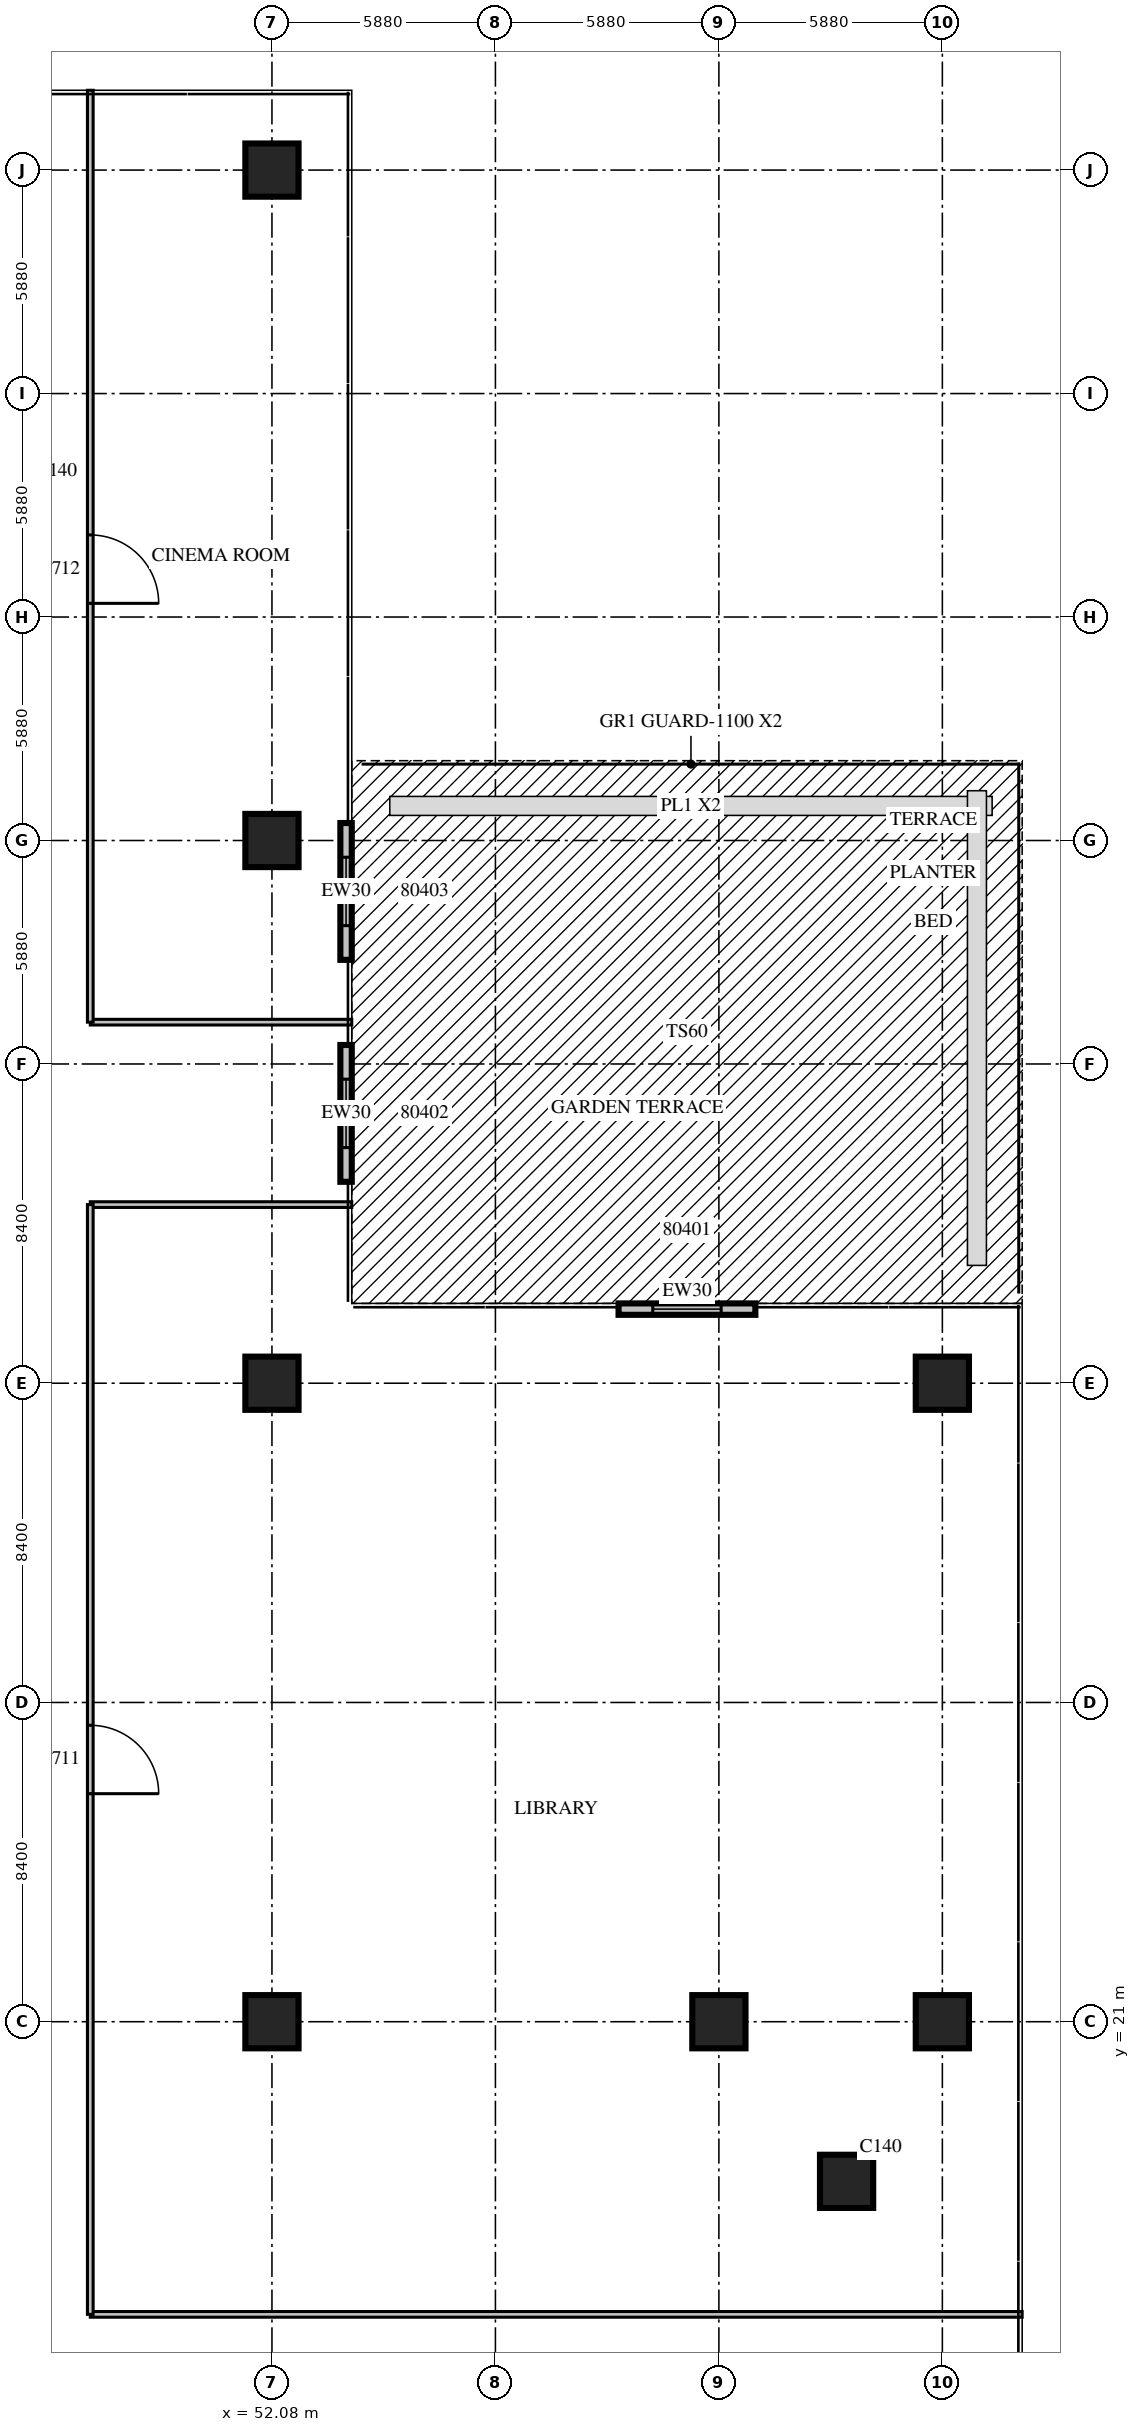
"""IFC4 building model, lengths in metres.
Left out: names, types, materials, properties, quantities, classifications, styles, units other than length and angle.
Written with IfcOpenShell. Run it as: python <this file> out.ifc"""

import sys

from ifc_helpers import new_model, si_unit, direction, frame, frame_2d, origin, origin_2d, place, context, subcontext, project, spatial, rectangle, extrude, source, transform, mapped, element, fill, save


model = new_model("IFC4")
c1 = context("Model", 3, precision=1e-05, world=origin(), true_north=direction((0.0, 1.0)))
c2 = subcontext(c1, "Body", "Model", "MODEL_VIEW")
j1 = project(units=[si_unit("LENGTHUNIT", "METRE"), si_unit("PLANEANGLEUNIT", "RADIAN")], contexts=[c1])
p1 = place(None, origin())
s1 = spatial("IfcSite", under=j1, at=p1, CompositionType="ELEMENT")
p2 = place(p1, origin())
s2 = spatial("IfcBuilding", under=s1, at=p2, CompositionType="ELEMENT")
p3 = place(p2, frame((0.0, 0.0, 23.7)))
s3 = spatial("IfcBuildingStorey", under=s2, at=p3, CompositionType="ELEMENT", Elevation=23.7)
m1 = source(origin(), c2, "Body", "SweptSolid", [
    extrude(rectangle(XDim=1.4, YDim=1.4, at=origin_2d()), origin(), (0.0, 0.0, 1.0), 5.4),
])
for number, where, z_axis, x_axis in (
    (1, (52.08, 21.0, 0.0), (0.0, 0.0, 1.0), (1.0, 0.0, 0.0)),
    (2, (52.08, 37.8, 0.0), (0.0, 0.0, 1.0), (1.0, 0.0, 0.0)),
    (3, (52.08, 52.08, 0.0), (0.0, 0.0, 1.0), (1.0, 0.0, 0.0)),
    (4, (52.08, 69.72, 0.0), (0.0, 0.0, 1.0), (1.0, 0.0, 0.0)),
    (5, (63.84, 21.0, 0.0), (0.0, 0.0, 1.0), (1.0, 0.0, 0.0)),
    (6, (67.2, 16.8, 0.0), (0.0, 0.0, 1.0), (1.0, 0.0, 0.0)),
    (7, (69.72, 21.0, 0.0), (0.0, 0.0, 1.0), (1.0, 0.0, 0.0)),
    (8, (69.72, 37.8, 0.0), (0.0, 0.0, 1.0), (1.0, 0.0, 0.0)),
):
    element("IfcColumn", number, at=place(p3, frame(where, z_axis=z_axis, x_axis=x_axis)), inside=s3, PredefinedType="COLUMN", context=c2, shape_type="MappedRepresentation", body=[
        mapped(m1, transform((0.0, 0.0, 0.0), scale=1.0)),
    ])
m2 = source(origin(), c2, "Body", "SweptSolid", [
    extrude(rectangle(XDim=3.6, YDim=0.3, at=frame_2d((1.8, 0.0))), origin(), (0.0, 0.0, 1.0), 4.8),
])
p4 = place(p3, frame((64.8, 39.75, 0.0), z_axis=(0.0, 0.0, 1.0), x_axis=(-1.0, 0.0, 0.0)))
e9 = element("IfcWall", 9, at=p4, inside=s3, PredefinedType="STANDARD", context=c2, shape_type="MappedRepresentation", body=[
    mapped(m2, transform((0.0, 0.0, 0.0), scale=1.0)),
])
m3 = source(origin(), c2, "Body", "SweptSolid", [
    extrude(rectangle(XDim=1.8, YDim=2.4, at=frame_2d((0.9, 1.2))), frame((0.0, 0.16, 0.0), z_axis=(0.0, -1.0, 0.0), x_axis=(1.0, 0.0, 0.0)), (0.0, 0.0, 1.0), 0.32),
])
p5 = place(p4, frame((0.9, 0.0, 0.0)))
e10 = element("IfcOpeningElement", 10, at=p5, cuts=e9, PredefinedType="OPENING", context=c2, shape_type="MappedRepresentation", body=[
    mapped(m3, transform((0.0, 0.0, 0.0), scale=1.0)),
])
p6 = place(p3, frame((54.03, 43.1, 0.0), z_axis=(0.0, 0.0, 1.0), x_axis=(0.0, 1.0, 0.0)))
e11 = element("IfcWall", 11, at=p6, inside=s3, PredefinedType="STANDARD", context=c2, shape_type="MappedRepresentation", body=[
    mapped(m2, transform((0.0, 0.0, 0.0), scale=1.0)),
])
p7 = place(p6, frame((0.9, 0.0, 0.0)))
e12 = element("IfcOpeningElement", 12, at=p7, cuts=e11, PredefinedType="OPENING", context=c2, shape_type="MappedRepresentation", body=[
    mapped(m3, transform((0.0, 0.0, 0.0), scale=1.0)),
])
p8 = place(p3, frame((54.03, 48.94, 0.0), z_axis=(0.0, 0.0, 1.0), x_axis=(0.0, 1.0, 0.0)))
e13 = element("IfcWall", 13, at=p8, inside=s3, PredefinedType="STANDARD", context=c2, shape_type="MappedRepresentation", body=[
    mapped(m2, transform((0.0, 0.0, 0.0), scale=1.0)),
])
p9 = place(p8, frame((0.9, 0.0, 0.0)))
e14 = element("IfcOpeningElement", 14, at=p9, cuts=e13, PredefinedType="OPENING", context=c2, shape_type="MappedRepresentation", body=[
    mapped(m3, transform((0.0, 0.0, 0.0), scale=1.0)),
])
m4 = source(origin(), c2, "Body", "SweptSolid", [
    extrude(rectangle(XDim=24.52, YDim=0.15, at=frame_2d((12.26, 0.0))), origin(), (0.0, 0.0, 1.0), 4.8),
])
p10 = place(p3, frame((47.3, 13.3, 0.0), z_axis=(0.0, 0.0, 1.0), x_axis=(1.0, 0.0, 0.0)))
e15 = element("IfcWall", 15, at=p10, inside=s3, PredefinedType="PARTITIONING", context=c2, shape_type="MappedRepresentation", body=[
    mapped(m4, transform((0.0, 0.0, 0.0), scale=1.0)),
])
m5 = source(origin(), c2, "Body", "SweptSolid", [
    extrude(rectangle(XDim=6.88, YDim=0.15, at=frame_2d((3.44, 0.0))), origin(), (0.0, 0.0, 1.0), 4.8),
])
for number, where, z_axis, x_axis in (
    (16, (47.3, 42.5, 0.0), (0.0, 0.0, 1.0), (1.0, 0.0, 0.0)),
    (17, (47.3, 47.3, 0.0), (0.0, 0.0, 1.0), (1.0, 0.0, 0.0)),
):
    element("IfcWall", number, at=place(p3, frame(where, z_axis=z_axis, x_axis=x_axis)), inside=s3, PredefinedType="PARTITIONING", context=c2, shape_type="MappedRepresentation", body=[
        mapped(m5, transform((0.0, 0.0, 0.0), scale=1.0)),
    ])
m6 = source(origin(), c2, "Body", "SweptSolid", [
    extrude(rectangle(XDim=29.2, YDim=0.15, at=frame_2d((14.6, 0.0))), origin(), (0.0, 0.0, 1.0), 4.8),
])
p11 = place(p3, frame((47.3, 13.3, 0.0), z_axis=(0.0, 0.0, 1.0), x_axis=(0.0, 1.0, 0.0)))
e18 = element("IfcWall", 18, at=p11, inside=s3, PredefinedType="PARTITIONING", context=c2, shape_type="MappedRepresentation", body=[
    mapped(m6, transform((0.0, 0.0, 0.0), scale=1.0)),
])
m7 = source(origin(), c2, "Body", "SweptSolid", [
    extrude(rectangle(XDim=1.8, YDim=2.1, at=frame_2d((0.9, 1.05))), frame((0.0, 0.085, 0.0), z_axis=(0.0, -1.0, 0.0), x_axis=(1.0, 0.0, 0.0)), (0.0, 0.0, 1.0), 0.17),
])
p12 = place(p11, frame((13.7, 0.0, 0.0)))
e19 = element("IfcOpeningElement", 19, at=p12, cuts=e18, PredefinedType="OPENING", context=c2, shape_type="MappedRepresentation", body=[
    mapped(m7, transform((0.0, 0.0, 0.0), scale=1.0)),
])
p13 = place(p3, frame((47.3, 47.3, 0.0), z_axis=(0.0, 0.0, 1.0), x_axis=(0.0, 1.0, 0.0)))
e20 = element("IfcWall", 20, at=p13, inside=s3, PredefinedType="PARTITIONING", context=c2, shape_type="MappedRepresentation", body=[
    mapped(m4, transform((0.0, 0.0, 0.0), scale=1.0)),
])
p14 = place(p13, frame((11.02, 0.0, 0.0)))
e21 = element("IfcOpeningElement", 21, at=p14, cuts=e20, PredefinedType="OPENING", context=c2, shape_type="MappedRepresentation", body=[
    mapped(m7, transform((0.0, 0.0, 0.0), scale=1.0)),
])
m8 = source(origin(), c2, "Body", "SweptSolid", [
    extrude(rectangle(XDim=1.8, YDim=2.4, at=frame_2d((0.9, 1.2))), frame((0.0, 0.025, 0.0), z_axis=(0.0, -1.0, 0.0), x_axis=(1.0, 0.0, 0.0)), (0.0, 0.0, 1.0), 0.05),
])
p15 = place(p5, origin())
e22 = element("IfcDoor", 22, at=p15, inside=s3, OperationType="SLIDING_TO_LEFT", PredefinedType="DOOR", context=c2, shape_type="MappedRepresentation", body=[
    mapped(m8, transform((0.0, 0.0, 0.0), scale=1.0)),
])
fill(e10, e22)
p16 = place(p7, origin())
e23 = element("IfcDoor", 23, at=p16, inside=s3, OperationType="SLIDING_TO_LEFT", PredefinedType="DOOR", context=c2, shape_type="MappedRepresentation", body=[
    mapped(m8, transform((0.0, 0.0, 0.0), scale=1.0)),
])
fill(e12, e23)
p17 = place(p9, origin())
e24 = element("IfcDoor", 24, at=p17, inside=s3, OperationType="SLIDING_TO_LEFT", PredefinedType="DOOR", context=c2, shape_type="MappedRepresentation", body=[
    mapped(m8, transform((0.0, 0.0, 0.0), scale=1.0)),
])
fill(e14, e24)
m9 = source(origin(), c2, "Body", "SweptSolid", [
    extrude(rectangle(XDim=1.8, YDim=2.1, at=frame_2d((0.9, 1.05))), frame((0.0, 0.025, 0.0), z_axis=(0.0, -1.0, 0.0), x_axis=(1.0, 0.0, 0.0)), (0.0, 0.0, 1.0), 0.05),
])
p18 = place(p12, origin())
e25 = element("IfcDoor", 25, at=p18, inside=s3, OperationType="DOUBLE_DOOR_SINGLE_SWING", PredefinedType="DOOR", context=c2, shape_type="MappedRepresentation", body=[
    mapped(m9, transform((0.0, 0.0, 0.0), scale=1.0)),
])
fill(e19, e25)
p19 = place(p14, origin())
e26 = element("IfcDoor", 26, at=p19, inside=s3, OperationType="DOUBLE_DOOR_SINGLE_SWING", PredefinedType="DOOR", context=c2, shape_type="MappedRepresentation", body=[
    mapped(m9, transform((0.0, 0.0, 0.0), scale=1.0)),
])
fill(e21, e26)
save(model, sys.argv[1])
